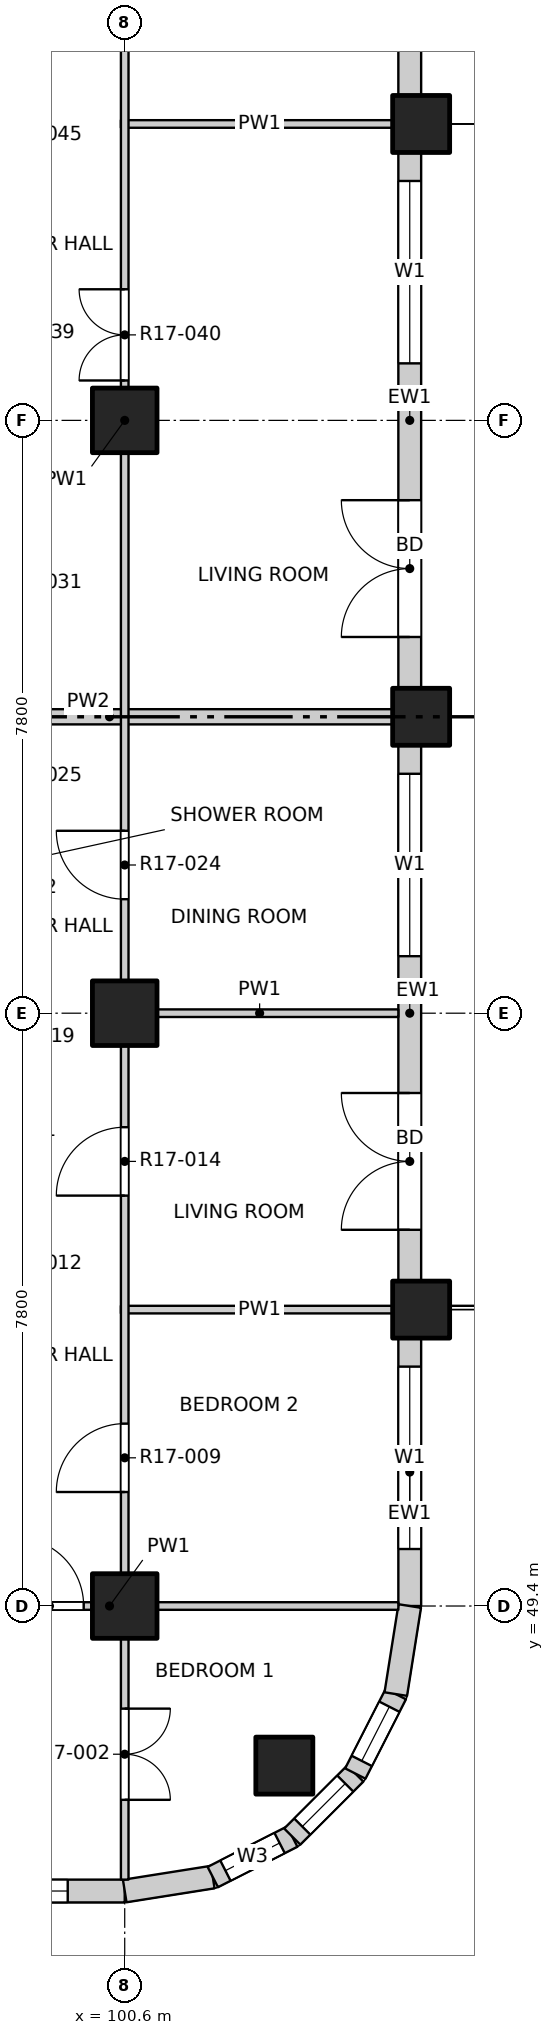
"""IFC4 building model, lengths in metres.
Left out: names, types, materials, properties, quantities, classifications, styles, units other than length and angle.
Written with IfcOpenShell. Run it as: python <this file> out.ifc"""

import sys

from ifc_helpers import new_model, si_unit, direction, frame, frame_2d, origin, origin_2d, place, context, subcontext, project, spatial, rectangle, extrude, element, fill, save


model = new_model("IFC4")
c1 = context("Model", 3, precision=1e-05, world=origin(), true_north=direction((0.0, 1.0)))
c2 = subcontext(c1, "Body", "Model", "MODEL_VIEW")
j1 = project(units=[si_unit("LENGTHUNIT", "METRE"), si_unit("PLANEANGLEUNIT", "RADIAN")], contexts=[c1])
p1 = place(None, origin())
s1 = spatial("IfcSite", under=j1, at=p1, CompositionType="ELEMENT")
p2 = place(p1, origin())
s2 = spatial("IfcBuilding", under=s1, at=p2, CompositionType="ELEMENT")
p3 = place(p2, frame((0.0, 0.0, 179.2)))
s3 = spatial("IfcBuildingStorey", under=s2, at=p3, CompositionType="ELEMENT", Elevation=179.2)
for number, where, z_axis, x_axis in (
    (1, (102.7, 47.3, -0.3), (0.0, 0.0, 1.0), (1.0, 0.0, 0.0)),
    (2, (104.5, 53.3, -0.3), (0.0, 0.0, 1.0), (1.0, 0.0, 0.0)),
    (3, (104.5, 61.1, -0.3), (0.0, 0.0, 1.0), (1.0, 0.0, 0.0)),
    (4, (104.5, 68.9, -0.3), (0.0, 0.0, 1.0), (1.0, 0.0, 0.0)),
):
    element("IfcColumn", number, at=place(p3, frame(where, z_axis=z_axis, x_axis=x_axis)), inside=s3, PredefinedType="COLUMN", context=c2, shape_type="SweptSolid", body=[
        extrude(rectangle(XDim=0.75, YDim=0.75, at=origin_2d()), origin(), (0.0, 0.0, 1.0), 3.45),
    ])
for number, where, z_axis, x_axis in (
    (5, (100.6, 49.4, -0.3), (0.0, 0.0, 1.0), (1.0, 0.0, 0.0)),
    (6, (100.6, 57.2, -0.3), (0.0, 0.0, 1.0), (1.0, 0.0, 0.0)),
    (7, (100.6, 65.0, -0.3), (0.0, 0.0, 1.0), (1.0, 0.0, 0.0)),
):
    element("IfcColumn", number, at=place(p3, frame(where, z_axis=z_axis, x_axis=x_axis)), inside=s3, PredefinedType="COLUMN", context=c2, shape_type="SweptSolid", body=[
        extrude(rectangle(XDim=0.85, YDim=0.85, at=origin_2d()), origin(), (0.0, 0.0, 1.0), 3.45),
    ])
p4 = place(p3, frame((97.075, 45.65, 0.0), z_axis=(0.0, 0.0, 1.0), x_axis=(1.0, 0.0, 0.0)))
e8 = element("IfcWall", 8, at=p4, inside=s3, PredefinedType="SOLIDWALL", context=c2, shape_type="SweptSolid", body=[
    extrude(rectangle(XDim=3.525, YDim=0.3, at=frame_2d((1.763, 0.0))), origin(), (0.0, 0.0, 1.0), 2.7),
])
p5 = place(p4, frame((0.375, 0.0, 0.9)))
e9 = element("IfcOpeningElement", 9, at=p5, cuts=e8, PredefinedType="OPENING", context=c2, shape_type="SweptSolid", body=[
    extrude(rectangle(XDim=2.4, YDim=1.8, at=frame_2d((1.2, 0.9))), frame((0.0, 0.16, 0.0), z_axis=(0.0, -1.0, 0.0), x_axis=(1.0, 0.0, 0.0)), (0.0, 0.0, 1.0), 0.32),
])
p6 = place(p3, frame((104.35, 49.4, 0.0), z_axis=(0.0, 0.0, 1.0), x_axis=(0.0, 1.0, 0.0)))
e10 = element("IfcWall", 10, at=p6, inside=s3, PredefinedType="SOLIDWALL", context=c2, shape_type="SweptSolid", body=[
    extrude(rectangle(XDim=3.525, YDim=0.3, at=frame_2d((1.763, 0.0))), origin(), (0.0, 0.0, 1.0), 2.7),
])
p7 = place(p6, frame((0.75, 0.0, 0.9)))
e11 = element("IfcOpeningElement", 11, at=p7, cuts=e10, PredefinedType="OPENING", context=c2, shape_type="SweptSolid", body=[
    extrude(rectangle(XDim=2.4, YDim=1.8, at=frame_2d((1.2, 0.9))), frame((0.0, 0.16, 0.0), z_axis=(0.0, -1.0, 0.0), x_axis=(1.0, 0.0, 0.0)), (0.0, 0.0, 1.0), 0.32),
])
p8 = place(p3, frame((104.35, 53.675, 0.0), z_axis=(0.0, 0.0, 1.0), x_axis=(0.0, 1.0, 0.0)))
e12 = element("IfcWall", 12, at=p8, inside=s3, PredefinedType="SOLIDWALL", context=c2, shape_type="SweptSolid", body=[
    extrude(rectangle(XDim=7.05, YDim=0.3, at=frame_2d((3.525, 0.0))), origin(), (0.0, 0.0, 1.0), 2.7),
])
p9 = place(p8, frame((0.675, 0.0, 0.0)))
e13 = element("IfcOpeningElement", 13, at=p9, cuts=e12, PredefinedType="OPENING", context=c2, shape_type="SweptSolid", body=[
    extrude(rectangle(XDim=1.8, YDim=2.4, at=frame_2d((0.9, 1.2))), frame((0.0, 0.16, 0.0), z_axis=(0.0, -1.0, 0.0), x_axis=(1.0, 0.0, 0.0)), (0.0, 0.0, 1.0), 0.32),
])
p10 = place(p8, frame((4.275, 0.0, 0.9)))
e14 = element("IfcOpeningElement", 14, at=p10, cuts=e12, PredefinedType="OPENING", context=c2, shape_type="SweptSolid", body=[
    extrude(rectangle(XDim=2.4, YDim=1.8, at=frame_2d((1.2, 0.9))), frame((0.0, 0.16, 0.0), z_axis=(0.0, -1.0, 0.0), x_axis=(1.0, 0.0, 0.0)), (0.0, 0.0, 1.0), 0.32),
])
p11 = place(p3, frame((104.35, 61.475, 0.0), z_axis=(0.0, 0.0, 1.0), x_axis=(0.0, 1.0, 0.0)))
e15 = element("IfcWall", 15, at=p11, inside=s3, PredefinedType="SOLIDWALL", context=c2, shape_type="SweptSolid", body=[
    extrude(rectangle(XDim=7.05, YDim=0.3, at=frame_2d((3.525, 0.0))), origin(), (0.0, 0.0, 1.0), 2.7),
])
p12 = place(p11, frame((0.675, 0.0, 0.0)))
e16 = element("IfcOpeningElement", 16, at=p12, cuts=e15, PredefinedType="OPENING", context=c2, shape_type="SweptSolid", body=[
    extrude(rectangle(XDim=1.8, YDim=2.4, at=frame_2d((0.9, 1.2))), frame((0.0, 0.16, 0.0), z_axis=(0.0, -1.0, 0.0), x_axis=(1.0, 0.0, 0.0)), (0.0, 0.0, 1.0), 0.32),
])
p13 = place(p11, frame((4.275, 0.0, 0.9)))
e17 = element("IfcOpeningElement", 17, at=p13, cuts=e15, PredefinedType="OPENING", context=c2, shape_type="SweptSolid", body=[
    extrude(rectangle(XDim=2.4, YDim=1.8, at=frame_2d((1.2, 0.9))), frame((0.0, 0.16, 0.0), z_axis=(0.0, -1.0, 0.0), x_axis=(1.0, 0.0, 0.0)), (0.0, 0.0, 1.0), 0.32),
])
p14 = place(p3, frame((104.35, 69.275, 0.0), z_axis=(0.0, 0.0, 1.0), x_axis=(0.0, 1.0, 0.0)))
e18 = element("IfcWall", 18, at=p14, inside=s3, PredefinedType="SOLIDWALL", context=c2, shape_type="SweptSolid", body=[
    extrude(rectangle(XDim=7.05, YDim=0.3, at=frame_2d((3.525, 0.0))), origin(), (0.0, 0.0, 1.0), 2.7),
])
p15 = place(p14, frame((0.675, 0.0, 0.0)))
e19 = element("IfcOpeningElement", 19, at=p15, cuts=e18, PredefinedType="OPENING", context=c2, shape_type="SweptSolid", body=[
    extrude(rectangle(XDim=1.8, YDim=2.4, at=frame_2d((0.9, 1.2))), frame((0.0, 0.16, 0.0), z_axis=(0.0, -1.0, 0.0), x_axis=(1.0, 0.0, 0.0)), (0.0, 0.0, 1.0), 0.32),
])
p16 = place(p14, frame((4.275, 0.0, 0.9)))
e20 = element("IfcOpeningElement", 20, at=p16, cuts=e18, PredefinedType="OPENING", context=c2, shape_type="SweptSolid", body=[
    extrude(rectangle(XDim=2.4, YDim=1.8, at=frame_2d((1.2, 0.9))), frame((0.0, 0.16, 0.0), z_axis=(0.0, -1.0, 0.0), x_axis=(1.0, 0.0, 0.0)), (0.0, 0.0, 1.0), 0.32),
])
p17 = place(p3, frame((100.6, 45.65, 0.0), z_axis=(0.0, 0.0, 1.0), x_axis=(0.987678452879, 0.156496880861, 0.0)))
e21 = element("IfcWall", 21, at=p17, inside=s3, PredefinedType="SOLIDWALL", context=c2, shape_type="SweptSolid", body=[
    extrude(rectangle(XDim=1.173, YDim=0.3, at=frame_2d((0.586, 0.0))), origin(), (0.0, 0.0, 1.0), 2.7),
])
p18 = place(p3, frame((101.759, 45.833, 0.0), z_axis=(0.0, 0.0, 1.0), x_axis=(0.890988677504, 0.454025524128, 0.0)))
e22 = element("IfcWall", 22, at=p18, inside=s3, PredefinedType="SOLIDWALL", context=c2, shape_type="SweptSolid", body=[
    extrude(rectangle(XDim=1.173, YDim=0.3, at=frame_2d((0.587, 0.0))), origin(), (0.0, 0.0, 1.0), 2.7),
])
p19 = place(p18, frame((0.187, 0.0, 0.9)))
e23 = element("IfcOpeningElement", 23, at=p19, cuts=e22, PredefinedType="OPENING", context=c2, shape_type="SweptSolid", body=[
    extrude(rectangle(XDim=0.8, YDim=1.2, at=frame_2d((0.4, 0.6))), frame((0.0, 0.16, 0.0), z_axis=(0.0, -1.0, 0.0), x_axis=(1.0, 0.0, 0.0)), (0.0, 0.0, 1.0), 0.32),
])
p20 = place(p3, frame((102.804, 46.366, 0.0), z_axis=(0.0, 0.0, 1.0), x_axis=(0.707106781187, 0.707106781187, 0.0)))
e24 = element("IfcWall", 24, at=p20, inside=s3, PredefinedType="SOLIDWALL", context=c2, shape_type="SweptSolid", body=[
    extrude(rectangle(XDim=1.173, YDim=0.3, at=frame_2d((0.586, 0.0))), origin(), (0.0, 0.0, 1.0), 2.7),
])
p21 = place(p20, frame((0.187, 0.0, 0.9)))
e25 = element("IfcOpeningElement", 25, at=p21, cuts=e24, PredefinedType="OPENING", context=c2, shape_type="SweptSolid", body=[
    extrude(rectangle(XDim=0.8, YDim=1.2, at=frame_2d((0.4, 0.6))), frame((0.0, 0.16, 0.0), z_axis=(0.0, -1.0, 0.0), x_axis=(1.0, 0.0, 0.0)), (0.0, 0.0, 1.0), 0.32),
])
p22 = place(p3, frame((103.634, 47.196, 0.0), z_axis=(0.0, 0.0, 1.0), x_axis=(0.454025524128, 0.890988677504, 0.0)))
e26 = element("IfcWall", 26, at=p22, inside=s3, PredefinedType="SOLIDWALL", context=c2, shape_type="SweptSolid", body=[
    extrude(rectangle(XDim=1.173, YDim=0.3, at=frame_2d((0.587, 0.0))), origin(), (0.0, 0.0, 1.0), 2.7),
])
p23 = place(p22, frame((0.187, 0.0, 0.9)))
e27 = element("IfcOpeningElement", 27, at=p23, cuts=e26, PredefinedType="OPENING", context=c2, shape_type="SweptSolid", body=[
    extrude(rectangle(XDim=0.8, YDim=1.2, at=frame_2d((0.4, 0.6))), frame((0.0, 0.16, 0.0), z_axis=(0.0, -1.0, 0.0), x_axis=(1.0, 0.0, 0.0)), (0.0, 0.0, 1.0), 0.32),
])
p24 = place(p3, frame((104.167, 48.241, 0.0), z_axis=(0.0, 0.0, 1.0), x_axis=(0.156496880861, 0.987678452879, 0.0)))
e28 = element("IfcWall", 28, at=p24, inside=s3, PredefinedType="SOLIDWALL", context=c2, shape_type="SweptSolid", body=[
    extrude(rectangle(XDim=1.173, YDim=0.3, at=frame_2d((0.586, 0.0))), origin(), (0.0, 0.0, 1.0), 2.7),
])
p25 = place(p3, frame((96.6, 49.4, 0.0), z_axis=(0.0, 0.0, 1.0), x_axis=(1.0, 0.0, 0.0)))
e29 = element("IfcWall", 29, at=p25, inside=s3, PredefinedType="PARTITIONING", context=c2, shape_type="SweptSolid", body=[
    extrude(rectangle(XDim=7.6, YDim=0.1, at=frame_2d((3.8, 0.0))), origin(), (0.0, 0.0, 1.0), 3.15),
])
p26 = place(p25, frame((2.56, 0.0, 0.0)))
e30 = element("IfcOpeningElement", 30, at=p26, cuts=e29, PredefinedType="OPENING", context=c2, shape_type="SweptSolid", body=[
    extrude(rectangle(XDim=0.9, YDim=2.1, at=frame_2d((0.45, 1.05))), frame((0.0, 0.06, 0.0), z_axis=(0.0, -1.0, 0.0), x_axis=(1.0, 0.0, 0.0)), (0.0, 0.0, 1.0), 0.12),
])
for number, where, z_axis, x_axis in (
    (31, (100.55, 53.3, 0.0), (0.0, 0.0, 1.0), (1.0, 0.0, 0.0)),
    (32, (100.55, 57.2, 0.0), (0.0, 0.0, 1.0), (1.0, 0.0, 0.0)),
):
    element("IfcWall", number, at=place(p3, frame(where, z_axis=z_axis, x_axis=x_axis)), inside=s3, PredefinedType="PARTITIONING", context=c2, shape_type="SweptSolid", body=[
        extrude(rectangle(XDim=3.65, YDim=0.1, at=frame_2d((1.825, 0.0))), origin(), (0.0, 0.0, 1.0), 3.15),
    ])
p27 = place(p3, frame((96.6, 61.1, 0.0), z_axis=(0.0, 0.0, 1.0), x_axis=(1.0, 0.0, 0.0)))
e33 = element("IfcWall", 33, at=p27, inside=s3, PredefinedType="PARTITIONING", context=c2, shape_type="SweptSolid", body=[
    extrude(rectangle(XDim=7.6, YDim=0.2, at=frame_2d((3.8, 0.0))), origin(), (0.0, 0.0, 1.0), 2.55),
])
p28 = place(p3, frame((100.55, 68.9, 0.0), z_axis=(0.0, 0.0, 1.0), x_axis=(1.0, 0.0, 0.0)))
e34 = element("IfcWall", 34, at=p28, inside=s3, PredefinedType="PARTITIONING", context=c2, shape_type="SweptSolid", body=[
    extrude(rectangle(XDim=3.65, YDim=0.1, at=frame_2d((1.825, 0.0))), origin(), (0.0, 0.0, 1.0), 2.55),
])
p29 = place(p3, frame((100.6, 45.8, 0.0), z_axis=(0.0, 0.0, 1.0), x_axis=(0.0, 1.0, 0.0)))
e35 = element("IfcWall", 35, at=p29, inside=s3, PredefinedType="PARTITIONING", context=c2, shape_type="SweptSolid", body=[
    extrude(rectangle(XDim=38.4, YDim=0.1, at=frame_2d((19.2, 0.0))), origin(), (0.0, 0.0, 1.0), 3.15),
])
p30 = place(p29, frame((1.05, 0.0, 0.0)))
e36 = element("IfcOpeningElement", 36, at=p30, cuts=e35, PredefinedType="OPENING", context=c2, shape_type="SweptSolid", body=[
    extrude(rectangle(XDim=1.2, YDim=2.1, at=frame_2d((0.6, 1.05))), frame((0.0, 0.06, 0.0), z_axis=(0.0, -1.0, 0.0), x_axis=(1.0, 0.0, 0.0)), (0.0, 0.0, 1.0), 0.12),
])
p31 = place(p29, frame((5.1, 0.0, 0.0)))
e37 = element("IfcOpeningElement", 37, at=p31, cuts=e35, PredefinedType="OPENING", context=c2, shape_type="SweptSolid", body=[
    extrude(rectangle(XDim=0.9, YDim=2.1, at=frame_2d((0.45, 1.05))), frame((0.0, 0.06, 0.0), z_axis=(0.0, -1.0, 0.0), x_axis=(1.0, 0.0, 0.0)), (0.0, 0.0, 1.0), 0.12),
])
p32 = place(p29, frame((9.0, 0.0, 0.0)))
e38 = element("IfcOpeningElement", 38, at=p32, cuts=e35, PredefinedType="OPENING", context=c2, shape_type="SweptSolid", body=[
    extrude(rectangle(XDim=0.9, YDim=2.1, at=frame_2d((0.45, 1.05))), frame((0.0, 0.06, 0.0), z_axis=(0.0, -1.0, 0.0), x_axis=(1.0, 0.0, 0.0)), (0.0, 0.0, 1.0), 0.12),
])
p33 = place(p29, frame((12.9, 0.0, 0.0)))
e39 = element("IfcOpeningElement", 39, at=p33, cuts=e35, PredefinedType="OPENING", context=c2, shape_type="SweptSolid", body=[
    extrude(rectangle(XDim=0.9, YDim=2.1, at=frame_2d((0.45, 1.05))), frame((0.0, 0.06, 0.0), z_axis=(0.0, -1.0, 0.0), x_axis=(1.0, 0.0, 0.0)), (0.0, 0.0, 1.0), 0.12),
])
p34 = place(p29, frame((19.725, 0.0, 0.0)))
e40 = element("IfcOpeningElement", 40, at=p34, cuts=e35, PredefinedType="OPENING", context=c2, shape_type="SweptSolid", body=[
    extrude(rectangle(XDim=1.2, YDim=2.1, at=frame_2d((0.6, 1.05))), frame((0.0, 0.06, 0.0), z_axis=(0.0, -1.0, 0.0), x_axis=(1.0, 0.0, 0.0)), (0.0, 0.0, 1.0), 0.12),
])
p35 = place(p29, frame((24.6, 0.0, 0.0)))
e41 = element("IfcOpeningElement", 41, at=p35, cuts=e35, PredefinedType="OPENING", context=c2, shape_type="SweptSolid", body=[
    extrude(rectangle(XDim=0.9, YDim=2.1, at=frame_2d((0.45, 1.05))), frame((0.0, 0.06, 0.0), z_axis=(0.0, -1.0, 0.0), x_axis=(1.0, 0.0, 0.0)), (0.0, 0.0, 1.0), 0.12),
])
p36 = place(p29, frame((28.5, 0.0, 0.0)))
e42 = element("IfcOpeningElement", 42, at=p36, cuts=e35, PredefinedType="OPENING", context=c2, shape_type="SweptSolid", body=[
    extrude(rectangle(XDim=0.9, YDim=2.1, at=frame_2d((0.45, 1.05))), frame((0.0, 0.06, 0.0), z_axis=(0.0, -1.0, 0.0), x_axis=(1.0, 0.0, 0.0)), (0.0, 0.0, 1.0), 0.12),
])
p37 = place(p29, frame((32.4, 0.0, 0.0)))
e43 = element("IfcOpeningElement", 43, at=p37, cuts=e35, PredefinedType="OPENING", context=c2, shape_type="SweptSolid", body=[
    extrude(rectangle(XDim=0.9, YDim=2.1, at=frame_2d((0.45, 1.05))), frame((0.0, 0.06, 0.0), z_axis=(0.0, -1.0, 0.0), x_axis=(1.0, 0.0, 0.0)), (0.0, 0.0, 1.0), 0.12),
])
p38 = place(p29, frame((36.15, 0.0, 0.0)))
e44 = element("IfcOpeningElement", 44, at=p38, cuts=e35, PredefinedType="OPENING", context=c2, shape_type="SweptSolid", body=[
    extrude(rectangle(XDim=1.2, YDim=2.1, at=frame_2d((0.6, 1.05))), frame((0.0, 0.06, 0.0), z_axis=(0.0, -1.0, 0.0), x_axis=(1.0, 0.0, 0.0)), (0.0, 0.0, 1.0), 0.12),
])
p39 = place(p5, origin())
e45 = element("IfcWindow", 45, at=p39, inside=s3, PartitioningType="DOUBLE_PANEL_VERTICAL", PredefinedType="WINDOW", context=c2, shape_type="SweptSolid", body=[
    extrude(rectangle(XDim=2.4, YDim=1.8, at=frame_2d((1.2, 0.9))), frame((0.0, 0.03, 0.0), z_axis=(0.0, -1.0, 0.0), x_axis=(1.0, 0.0, 0.0)), (0.0, 0.0, 1.0), 0.06),
])
fill(e9, e45)
p40 = place(p7, origin())
e46 = element("IfcWindow", 46, at=p40, inside=s3, PartitioningType="DOUBLE_PANEL_VERTICAL", PredefinedType="WINDOW", context=c2, shape_type="SweptSolid", body=[
    extrude(rectangle(XDim=2.4, YDim=1.8, at=frame_2d((1.2, 0.9))), frame((0.0, 0.03, 0.0), z_axis=(0.0, -1.0, 0.0), x_axis=(1.0, 0.0, 0.0)), (0.0, 0.0, 1.0), 0.06),
])
fill(e11, e46)
p41 = place(p9, origin())
e47 = element("IfcDoor", 47, at=p41, inside=s3, OperationType="DOUBLE_DOOR_SINGLE_SWING", PredefinedType="DOOR", context=c2, shape_type="SweptSolid", body=[
    extrude(rectangle(XDim=1.8, YDim=2.4, at=frame_2d((0.9, 1.2))), frame((0.0, 0.025, 0.0), z_axis=(0.0, -1.0, 0.0), x_axis=(1.0, 0.0, 0.0)), (0.0, 0.0, 1.0), 0.05),
])
fill(e13, e47)
p42 = place(p10, origin())
e48 = element("IfcWindow", 48, at=p42, inside=s3, PartitioningType="DOUBLE_PANEL_VERTICAL", PredefinedType="WINDOW", context=c2, shape_type="SweptSolid", body=[
    extrude(rectangle(XDim=2.4, YDim=1.8, at=frame_2d((1.2, 0.9))), frame((0.0, 0.03, 0.0), z_axis=(0.0, -1.0, 0.0), x_axis=(1.0, 0.0, 0.0)), (0.0, 0.0, 1.0), 0.06),
])
fill(e14, e48)
p43 = place(p12, origin())
e49 = element("IfcDoor", 49, at=p43, inside=s3, OperationType="DOUBLE_DOOR_SINGLE_SWING", PredefinedType="DOOR", context=c2, shape_type="SweptSolid", body=[
    extrude(rectangle(XDim=1.8, YDim=2.4, at=frame_2d((0.9, 1.2))), frame((0.0, 0.025, 0.0), z_axis=(0.0, -1.0, 0.0), x_axis=(1.0, 0.0, 0.0)), (0.0, 0.0, 1.0), 0.05),
])
fill(e16, e49)
p44 = place(p13, origin())
e50 = element("IfcWindow", 50, at=p44, inside=s3, PartitioningType="DOUBLE_PANEL_VERTICAL", PredefinedType="WINDOW", context=c2, shape_type="SweptSolid", body=[
    extrude(rectangle(XDim=2.4, YDim=1.8, at=frame_2d((1.2, 0.9))), frame((0.0, 0.03, 0.0), z_axis=(0.0, -1.0, 0.0), x_axis=(1.0, 0.0, 0.0)), (0.0, 0.0, 1.0), 0.06),
])
fill(e17, e50)
p45 = place(p19, origin())
e51 = element("IfcWindow", 51, at=p45, inside=s3, PartitioningType="SINGLE_PANEL", PredefinedType="WINDOW", context=c2, shape_type="SweptSolid", body=[
    extrude(rectangle(XDim=0.8, YDim=1.2, at=frame_2d((0.4, 0.6))), frame((0.0, 0.03, 0.0), z_axis=(0.0, -1.0, 0.0), x_axis=(1.0, 0.0, 0.0)), (0.0, 0.0, 1.0), 0.06),
])
fill(e23, e51)
p46 = place(p21, origin())
e52 = element("IfcWindow", 52, at=p46, inside=s3, PartitioningType="SINGLE_PANEL", PredefinedType="WINDOW", context=c2, shape_type="SweptSolid", body=[
    extrude(rectangle(XDim=0.8, YDim=1.2, at=frame_2d((0.4, 0.6))), frame((0.0, 0.03, 0.0), z_axis=(0.0, -1.0, 0.0), x_axis=(1.0, 0.0, 0.0)), (0.0, 0.0, 1.0), 0.06),
])
fill(e25, e52)
p47 = place(p23, origin())
e53 = element("IfcWindow", 53, at=p47, inside=s3, PartitioningType="SINGLE_PANEL", PredefinedType="WINDOW", context=c2, shape_type="SweptSolid", body=[
    extrude(rectangle(XDim=0.8, YDim=1.2, at=frame_2d((0.4, 0.6))), frame((0.0, 0.03, 0.0), z_axis=(0.0, -1.0, 0.0), x_axis=(1.0, 0.0, 0.0)), (0.0, 0.0, 1.0), 0.06),
])
fill(e27, e53)
p48 = place(p30, origin())
e54 = element("IfcDoor", 54, at=p48, inside=s3, OperationType="DOUBLE_DOOR_SINGLE_SWING", PredefinedType="DOOR", context=c2, shape_type="SweptSolid", body=[
    extrude(rectangle(XDim=1.2, YDim=2.1, at=frame_2d((0.6, 1.05))), frame((0.0, 0.025, 0.0), z_axis=(0.0, -1.0, 0.0), x_axis=(1.0, 0.0, 0.0)), (0.0, 0.0, 1.0), 0.05),
])
fill(e36, e54)
p49 = place(p26, origin())
e55 = element("IfcDoor", 55, at=p49, inside=s3, OperationType="SINGLE_SWING_LEFT", PredefinedType="DOOR", context=c2, shape_type="SweptSolid", body=[
    extrude(rectangle(XDim=0.9, YDim=2.1, at=frame_2d((0.45, 1.05))), frame((0.0, 0.025, 0.0), z_axis=(0.0, -1.0, 0.0), x_axis=(1.0, 0.0, 0.0)), (0.0, 0.0, 1.0), 0.05),
])
fill(e30, e55)
p50 = place(p31, origin())
e56 = element("IfcDoor", 56, at=p50, inside=s3, OperationType="SINGLE_SWING_LEFT", PredefinedType="DOOR", context=c2, shape_type="SweptSolid", body=[
    extrude(rectangle(XDim=0.9, YDim=2.1, at=frame_2d((0.45, 1.05))), frame((0.0, 0.025, 0.0), z_axis=(0.0, -1.0, 0.0), x_axis=(1.0, 0.0, 0.0)), (0.0, 0.0, 1.0), 0.05),
])
fill(e37, e56)
p51 = place(p32, origin())
e57 = element("IfcDoor", 57, at=p51, inside=s3, OperationType="SINGLE_SWING_LEFT", PredefinedType="DOOR", context=c2, shape_type="SweptSolid", body=[
    extrude(rectangle(XDim=0.9, YDim=2.1, at=frame_2d((0.45, 1.05))), frame((0.0, 0.025, 0.0), z_axis=(0.0, -1.0, 0.0), x_axis=(1.0, 0.0, 0.0)), (0.0, 0.0, 1.0), 0.05),
])
fill(e38, e57)
p52 = place(p33, origin())
e58 = element("IfcDoor", 58, at=p52, inside=s3, OperationType="SINGLE_SWING_RIGHT", PredefinedType="DOOR", context=c2, shape_type="SweptSolid", body=[
    extrude(rectangle(XDim=0.9, YDim=2.1, at=frame_2d((0.45, 1.05))), frame((0.0, 0.025, 0.0), z_axis=(0.0, -1.0, 0.0), x_axis=(1.0, 0.0, 0.0)), (0.0, 0.0, 1.0), 0.05),
])
fill(e39, e58)
p53 = place(p34, origin())
e59 = element("IfcDoor", 59, at=p53, inside=s3, OperationType="DOUBLE_DOOR_SINGLE_SWING", PredefinedType="DOOR", context=c2, shape_type="SweptSolid", body=[
    extrude(rectangle(XDim=1.2, YDim=2.1, at=frame_2d((0.6, 1.05))), frame((0.0, 0.025, 0.0), z_axis=(0.0, -1.0, 0.0), x_axis=(1.0, 0.0, 0.0)), (0.0, 0.0, 1.0), 0.05),
])
fill(e40, e59)
save(model, sys.argv[1])
